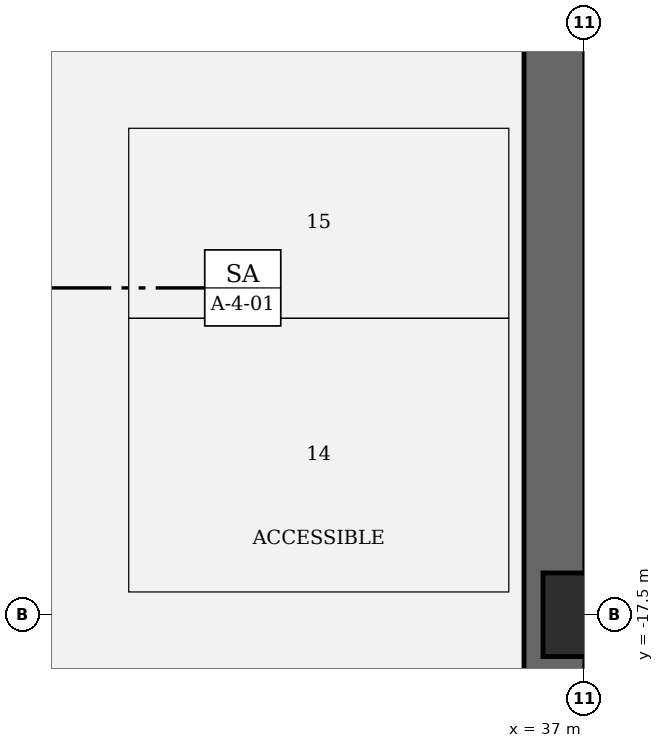
"""IFC4 building model, lengths in metres.
Left out: names, types, materials, properties, quantities, classifications, styles, units other than length and angle.
Written with IfcOpenShell. Run it as: python <this file> out.ifc"""

import sys

from ifc_helpers import new_model, si_unit, direction, frame, frame_2d, origin, origin_2d, place, context, subcontext, project, spatial, rectangle, extrude, element, save


model = new_model("IFC4")
c1 = context("Model", 3, precision=1e-05, world=origin(), true_north=direction((0.0, 1.0)))
c2 = subcontext(c1, "Body", "Model", "MODEL_VIEW")
j1 = project(units=[si_unit("LENGTHUNIT", "METRE"), si_unit("PLANEANGLEUNIT", "RADIAN")], contexts=[c1])
p1 = place(None, origin())
s1 = spatial("IfcSite", under=j1, at=p1, CompositionType="ELEMENT")
p2 = place(p1, origin())
s2 = spatial("IfcBuilding", under=s1, at=p2, CompositionType="ELEMENT")
p3 = place(p2, frame((0.0, 0.0, -9.6)))
s3 = spatial("IfcBuildingStorey", under=s2, at=p3, CompositionType="ELEMENT", Elevation=-9.6)
p4 = place(p3, frame((37.0, -17.5, 0.0), z_axis=(0.0, 0.0, 1.0), x_axis=(1.0, 0.0, 0.0)))
e1 = element("IfcColumn", 1, at=p4, inside=s3, PredefinedType="COLUMN", context=c2, shape_type="SweptSolid", body=[
    extrude(rectangle(XDim=1.1, YDim=1.1, at=origin_2d()), origin(), (0.0, 0.0, 1.0), 4.8),
])
p5 = place(p3, frame((36.6, 24.2, 0.0), z_axis=(0.0, 0.0, 1.0), x_axis=(0.0, -1.0, 0.0)))
e2 = element("IfcWall", 2, at=p5, inside=s3, PredefinedType="USERDEFINED", context=c2, shape_type="SweptSolid", body=[
    extrude(rectangle(XDim=48.4, YDim=0.8, at=frame_2d((24.2, 0.0))), origin(), (0.0, 0.0, 1.0), 4.8),
])
save(model, sys.argv[1])
